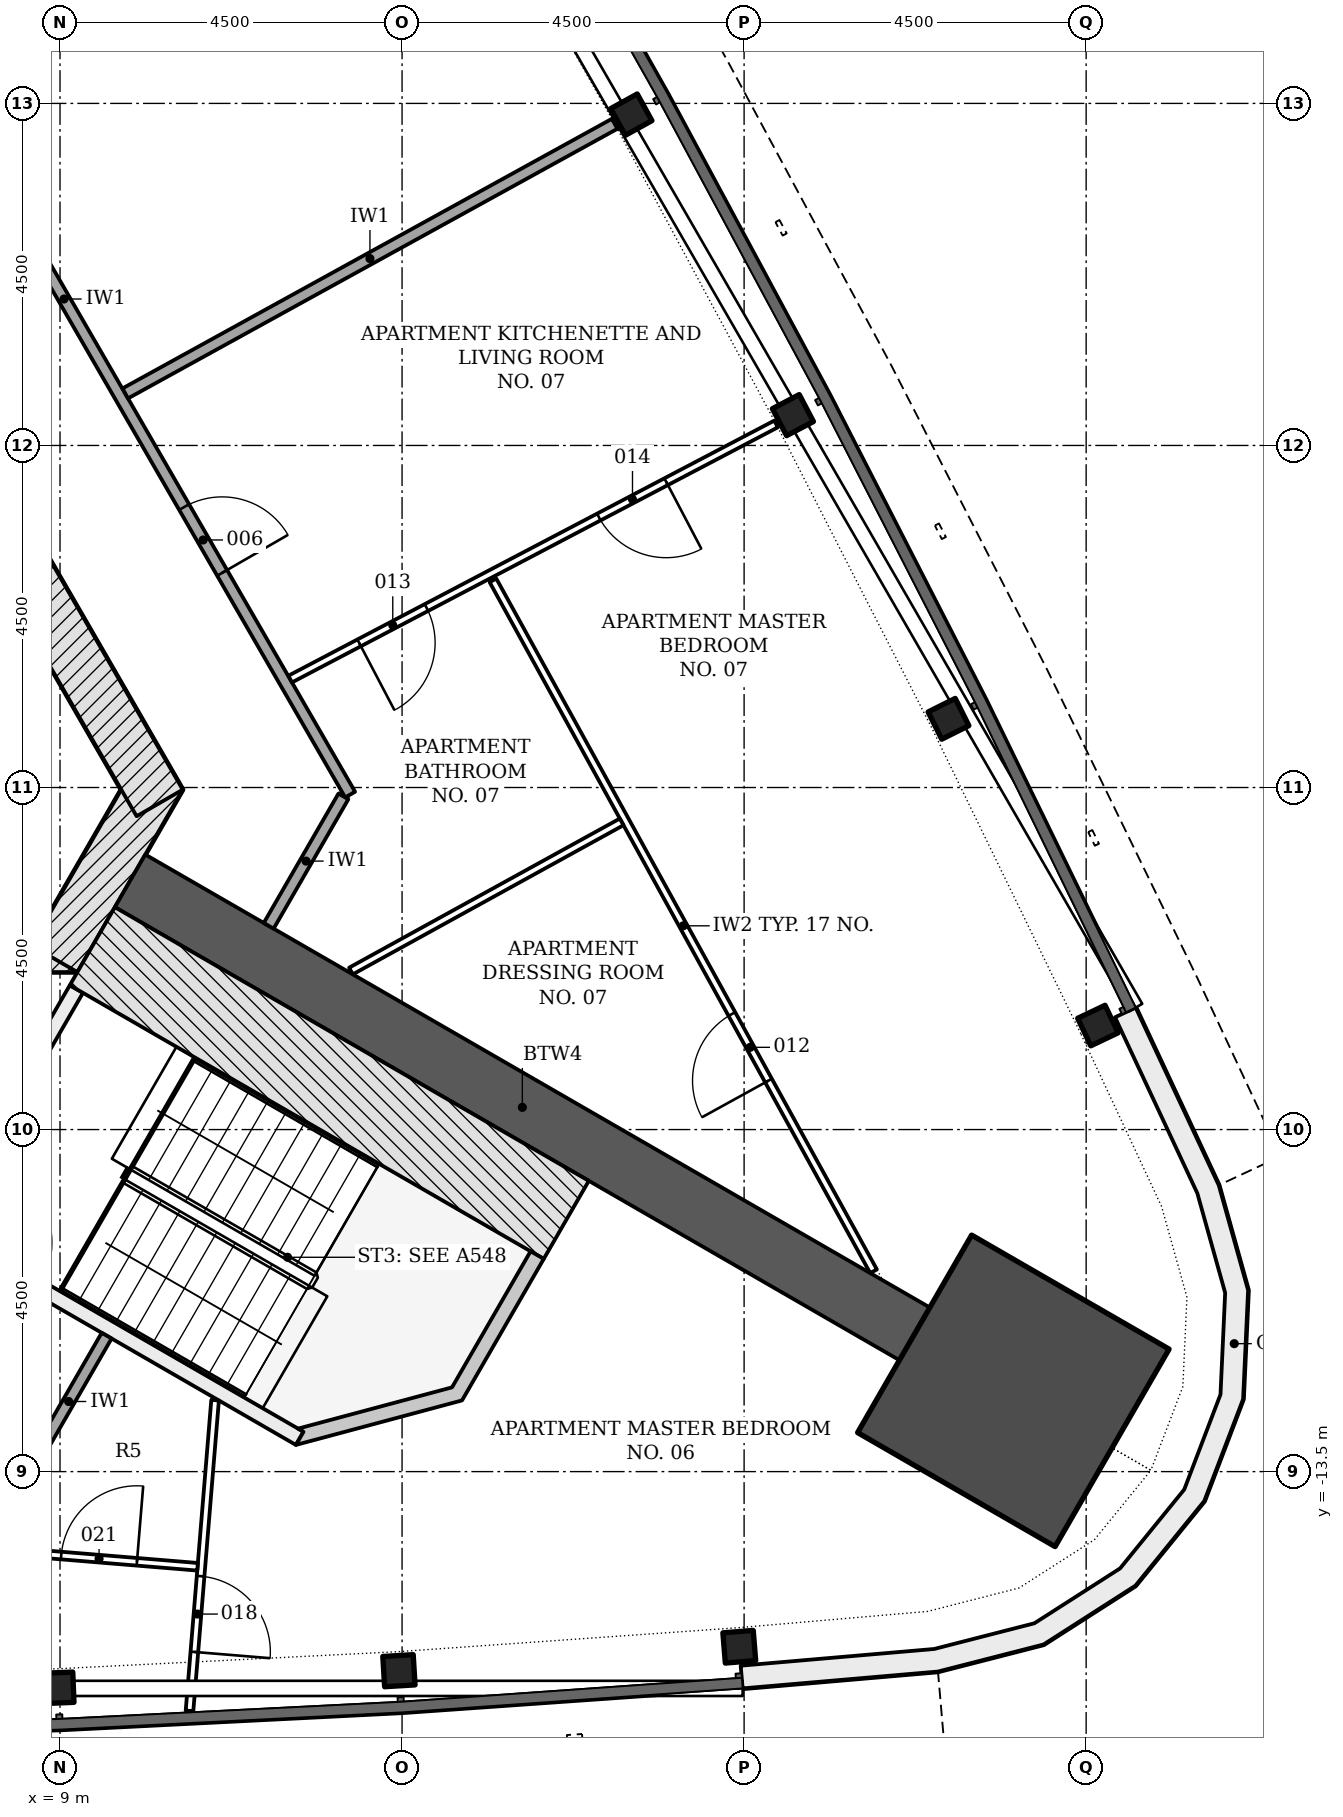
"""IFC4 building model, lengths in metres.
Left out: names, types, materials, properties, quantities, classifications, styles, units other than length and angle.
Written with IfcOpenShell. Run it as: python <this file> out.ifc"""

import sys

from ifc_helpers import new_model, si_unit, direction, frame, frame_2d, origin, origin_2d, place, context, subcontext, project, spatial, polyline, rectangle, i_section, outline, extrude, element, fill, save


model = new_model("IFC4")
c1 = context("Model", 3, precision=1e-05, world=origin(), true_north=direction((0.0, 1.0)))
c2 = subcontext(c1, "Body", "Model", "MODEL_VIEW")
j1 = project(units=[si_unit("LENGTHUNIT", "METRE"), si_unit("PLANEANGLEUNIT", "RADIAN")], contexts=[c1])
p1 = place(None, origin())
s1 = spatial("IfcSite", under=j1, at=p1, CompositionType="ELEMENT")
p2 = place(p1, origin())
s2 = spatial("IfcBuilding", under=s1, at=p2, CompositionType="ELEMENT")
p3 = place(p2, frame((0.0, 0.0, 109.5)))
s3 = spatial("IfcBuildingStorey", under=s2, at=p3, CompositionType="ELEMENT", Elevation=109.5)
p4 = place(p3, frame((-9.229, -6.578, -0.2), z_axis=(0.0, 0.0, 1.0), x_axis=(1.0, 0.0, 0.0)))
e1 = element("IfcWall", 1, at=p4, inside=s3, PredefinedType="SHEAR", context=c2, shape_type="SweptSolid", body=[
    extrude(rectangle(XDim=18.458, YDim=0.7, at=frame_2d((9.229, 0.0))), origin(), (0.0, 0.0, 1.0), 3.6),
])
p5 = place(p4, frame((3.304, 0.0, 0.2)))
e2 = element("IfcOpeningElement", 2, at=p5, cuts=e1, PredefinedType="OPENING", context=c2, shape_type="SweptSolid", body=[
    extrude(rectangle(XDim=1.1, YDim=2.1, at=frame_2d((0.55, 1.05))), frame((0.0, 0.36, 0.0), z_axis=(0.0, -1.0, 0.0), x_axis=(1.0, 0.0, 0.0)), (0.0, 0.0, 1.0), 0.72),
])
p6 = place(p4, frame((5.454, 0.0, 0.2)))
e3 = element("IfcOpeningElement", 3, at=p6, cuts=e1, PredefinedType="OPENING", context=c2, shape_type="SweptSolid", body=[
    extrude(rectangle(XDim=1.1, YDim=2.1, at=frame_2d((0.55, 1.05))), frame((0.0, 0.36, 0.0), z_axis=(0.0, -1.0, 0.0), x_axis=(1.0, 0.0, 0.0)), (0.0, 0.0, 1.0), 0.72),
])
p7 = place(p4, frame((7.604, 0.0, 0.2)))
e4 = element("IfcOpeningElement", 4, at=p7, cuts=e1, PredefinedType="OPENING", context=c2, shape_type="SweptSolid", body=[
    extrude(rectangle(XDim=1.1, YDim=2.1, at=frame_2d((0.55, 1.05))), frame((0.0, 0.36, 0.0), z_axis=(0.0, -1.0, 0.0), x_axis=(1.0, 0.0, 0.0)), (0.0, 0.0, 1.0), 0.72),
])
p8 = place(p4, frame((9.754, 0.0, 0.2)))
e5 = element("IfcOpeningElement", 5, at=p8, cuts=e1, PredefinedType="OPENING", context=c2, shape_type="SweptSolid", body=[
    extrude(rectangle(XDim=1.1, YDim=2.1, at=frame_2d((0.55, 1.05))), frame((0.0, 0.36, 0.0), z_axis=(0.0, -1.0, 0.0), x_axis=(1.0, 0.0, 0.0)), (0.0, 0.0, 1.0), 0.72),
])
p9 = place(p4, frame((11.904, 0.0, 0.2)))
e6 = element("IfcOpeningElement", 6, at=p9, cuts=e1, PredefinedType="OPENING", context=c2, shape_type="SweptSolid", body=[
    extrude(rectangle(XDim=1.1, YDim=2.1, at=frame_2d((0.55, 1.05))), frame((0.0, 0.36, 0.0), z_axis=(0.0, -1.0, 0.0), x_axis=(1.0, 0.0, 0.0)), (0.0, 0.0, 1.0), 0.72),
])
p10 = place(p4, frame((14.054, 0.0, 0.2)))
e7 = element("IfcOpeningElement", 7, at=p10, cuts=e1, PredefinedType="OPENING", context=c2, shape_type="SweptSolid", body=[
    extrude(rectangle(XDim=1.1, YDim=2.1, at=frame_2d((0.55, 1.05))), frame((0.0, 0.36, 0.0), z_axis=(0.0, -1.0, 0.0), x_axis=(1.0, 0.0, 0.0)), (0.0, 0.0, 1.0), 0.72),
])
p11 = place(p4, frame((1.029, 0.0, 0.2)))
e8 = element("IfcOpeningElement", 8, at=p11, cuts=e1, PredefinedType="OPENING", context=c2, shape_type="SweptSolid", body=[
    extrude(rectangle(XDim=1.0, YDim=2.1, at=frame_2d((0.5, 1.05))), frame((0.0, 0.36, 0.0), z_axis=(0.0, -1.0, 0.0), x_axis=(1.0, 0.0, 0.0)), (0.0, 0.0, 1.0), 0.72),
])
p12 = place(p3, frame((8.926, -6.753, -0.2), z_axis=(0.0, 0.0, 1.0), x_axis=(0.500042739161, 0.866000726912, 0.0)))
e9 = element("IfcWall", 9, at=p12, inside=s3, PredefinedType="SHEAR", context=c2, shape_type="SweptSolid", body=[
    extrude(rectangle(XDim=2.771, YDim=0.7, at=frame_2d((1.386, 0.0))), origin(), (0.0, 0.0, 1.0), 3.6),
])
p13 = place(p3, frame((10.311, -4.703, -0.2), z_axis=(0.0, 0.0, 1.0), x_axis=(-0.500001446645, 0.866024568562, 0.0)))
e10 = element("IfcWall", 10, at=p13, inside=s3, PredefinedType="SHEAR", context=c2, shape_type="SweptSolid", body=[
    extrude(rectangle(XDim=18.458, YDim=0.7, at=frame_2d((9.229, 0.0))), origin(), (0.0, 0.0, 1.0), 3.6),
])
p14 = place(p13, frame((10.5, 0.0, 0.2)))
e11 = element("IfcOpeningElement", 11, at=p14, cuts=e10, PredefinedType="OPENING", context=c2, shape_type="SweptSolid", body=[
    extrude(rectangle(XDim=1.0, YDim=2.1, at=frame_2d((0.5, 1.05))), frame((0.0, 0.36, 0.0), z_axis=(0.0, -1.0, 0.0), x_axis=(1.0, 0.0, 0.0)), (0.0, 0.0, 1.0), 0.72),
])
p15 = place(p13, frame((4.877, 0.0, 0.2)))
e12 = element("IfcOpeningElement", 12, at=p15, cuts=e10, PredefinedType="OPENING", context=c2, shape_type="SweptSolid", body=[
    extrude(rectangle(XDim=0.9, YDim=2.1, at=frame_2d((0.45, 1.05))), frame((0.0, 0.36, 0.0), z_axis=(0.0, -1.0, 0.0), x_axis=(1.0, 0.0, 0.0)), (0.0, 0.0, 1.0), 0.72),
])
p16 = place(p13, frame((14.452, 0.0, 0.2)))
e13 = element("IfcOpeningElement", 13, at=p16, cuts=e10, PredefinedType="OPENING", context=c2, shape_type="SweptSolid", body=[
    extrude(rectangle(XDim=0.9, YDim=2.1, at=frame_2d((0.45, 1.05))), frame((0.0, 0.36, 0.0), z_axis=(0.0, -1.0, 0.0), x_axis=(1.0, 0.0, 0.0)), (0.0, 0.0, 1.0), 0.72),
])
p17 = place(p3, frame((9.922, -5.728, -0.2), z_axis=(0.0, 0.0, 1.0), x_axis=(0.866027307971, -0.499996701837, 0.0)))
e14 = element("IfcWall", 14, at=p17, inside=s3, PredefinedType="SHEAR", context=c2, shape_type="SweptSolid", body=[
    extrude(rectangle(XDim=11.918, YDim=0.8, at=frame_2d((5.959, 0.0))), origin(), (0.0, 0.0, 1.0), 3.6),
])
p18 = place(p3, frame((21.542, -12.438, -0.2), z_axis=(0.0, 0.0, 1.0), x_axis=(0.866025403784, -0.5, 0.0)))
e15 = element("IfcColumn", 15, at=p18, inside=s3, PredefinedType="COLUMN", context=c2, shape_type="SweptSolid", body=[
    extrude(rectangle(XDim=3.0, YDim=3.0, at=origin_2d()), origin(), (0.0, 0.0, 1.0), 3.6),
])
for number, where, z_axis, x_axis in (
    (16, (8.976, -16.344, -0.2), (0.0, 0.0, 1.0), (0.999, 0.04, 0.0)),
    (17, (13.459, -16.119, -0.2), (0.0, 0.0, 1.0), (0.998, 0.06, 0.0)),
    (18, (17.937, -15.804, -0.2), (0.0, 0.0, 1.0), (0.997, 0.08, 0.0)),
    (19, (22.655, -7.632, -0.2), (0.0, 0.0, 1.0), (-0.429, 0.903, 0.0)),
    (20, (20.689, -3.596, -0.2), (0.0, 0.0, 1.0), (-0.447, 0.895, 0.0)),
    (21, (18.642, 0.399, -0.2), (0.0, 0.0, 1.0), (-0.465, 0.885, 0.0)),
    (22, (16.516, 4.353, -0.2), (0.0, 0.0, 1.0), (-0.483, 0.876, 0.0)),
):
    element("IfcColumn", number, at=place(p3, frame(where, z_axis=z_axis, x_axis=x_axis)), inside=s3, PredefinedType="COLUMN", context=c2, shape_type="SweptSolid", body=[
        extrude(i_section(OverallWidth=0.401, OverallDepth=0.399, WebThickness=0.025, FlangeThickness=0.04, FilletRadius=0.015, at=origin_2d()), origin(), (0.0, 0.0, 1.0), 3.6),
    ])
p19 = place(p3, origin())
e23 = element("IfcWall", 23, at=p19, inside=s3, PredefinedType="NOTDEFINED", context=c2, shape_type="SweptSolid", body=[
    extrude(outline(polyline([(17.981, -16.352), (20.551, -16.13), (21.94, -15.774), (23.148, -15.0), (24.054, -13.887), (24.565, -12.547), (24.631, -11.114), (24.245, -9.732), (23.152, -7.396), (22.88, -7.523), (23.962, -9.837), (24.329, -11.148), (24.267, -12.485), (23.791, -13.735), (22.946, -14.774), (21.819, -15.495), (20.5, -15.833), (17.955, -16.053), (17.981, -16.352)])), origin(), (0.0, 0.0, 1.0), 3.3),
])
p20 = place(p3, frame((7.44, -10.226, -0.2), z_axis=(0.0, 0.0, 1.0), x_axis=(0.500022077904, 0.866012656725, 0.0)))
e24 = element("IfcWall", 24, at=p20, inside=s3, PredefinedType="SHEAR", context=c2, shape_type="SweptSolid", body=[
    extrude(rectangle(XDim=3.55, YDim=0.2, at=frame_2d((1.775, 0.0))), origin(), (0.0, 0.0, 1.0), 3.6),
])
p21 = place(p20, frame((1.175, 0.0, 0.2)))
e25 = element("IfcOpeningElement", 25, at=p21, cuts=e24, PredefinedType="OPENING", context=c2, shape_type="SweptSolid", body=[
    extrude(rectangle(XDim=1.2, YDim=2.1, at=frame_2d((0.6, 1.05))), frame((0.0, 0.11, 0.0), z_axis=(0.0, -1.0, 0.0), x_axis=(1.0, 0.0, 0.0)), (0.0, 0.0, 1.0), 0.22),
])
p22 = place(p3, frame((7.304, -10.262, -0.2), z_axis=(0.0, 0.0, 1.0), x_axis=(0.866026594901, -0.49999793692, 0.0)))
e26 = element("IfcWall", 26, at=p22, inside=s3, PredefinedType="SHEAR", context=c2, shape_type="SweptSolid", body=[
    extrude(rectangle(XDim=5.6, YDim=0.2, at=frame_2d((2.8, 0.0))), origin(), (0.0, 0.0, 1.0), 3.6),
])
p23 = place(p22, frame((0.45, 0.0, 0.2)))
e27 = element("IfcOpeningElement", 27, at=p23, cuts=e26, PredefinedType="OPENING", context=c2, shape_type="SweptSolid", body=[
    extrude(rectangle(XDim=1.2, YDim=2.1, at=frame_2d((0.6, 1.05))), frame((0.0, 0.11, 0.0), z_axis=(0.0, -1.0, 0.0), x_axis=(1.0, 0.0, 0.0)), (0.0, 0.0, 1.0), 0.22),
])
p24 = place(p3, frame((9.425, -6.588, -0.2), z_axis=(0.0, 0.0, 1.0), x_axis=(0.866018442252, -0.500012057535, 0.0)))
e28 = element("IfcWall", 28, at=p24, inside=s3, PredefinedType="SHEAR", context=c2, shape_type="SweptSolid", body=[
    extrude(rectangle(XDim=7.2, YDim=1.186, at=frame_2d((3.6, 0.0))), origin(), (0.0, 0.0, 1.0), 3.6),
])
p25 = place(p3, frame((0.0, 0.0, -0.2)))
e29 = element("IfcWall", 29, at=p25, inside=s3, PredefinedType="SHEAR", context=c2, shape_type="SweptSolid", body=[
    extrude(outline(polyline([(12.104, -13.149), (14.289, -12.563), (15.364, -10.701), (15.191, -10.601), (14.157, -12.392), (12.132, -12.934), (12.204, -12.976), (12.204, -12.976), (12.204, -12.976), (12.204, -12.976), (12.204, -12.976), (12.204, -12.976), (12.204, -12.976), (12.204, -12.976), (12.204, -12.976), (12.204, -12.976), (12.204, -12.976), (12.204, -12.976), (12.204, -12.976), (12.204, -12.976), (12.204, -12.976), (12.204, -12.976), (12.204, -12.976), (12.104, -13.149)])), origin(), (0.0, 0.0, 1.0), 3.6),
])
p26 = place(p3, frame((5.289, 8.446, 0.0), z_axis=(0.0, 0.0, 1.0), x_axis=(0.499996620721, -0.866027354803, 0.0)))
e30 = element("IfcWall", 30, at=p26, inside=s3, PredefinedType="PARTITIONING", context=c2, shape_type="SweptSolid", body=[
    extrude(rectangle(XDim=15.057, YDim=0.15, at=frame_2d((7.528, 0.0))), origin(), (0.0, 0.0, 1.0), 2.847),
])
p27 = place(p26, frame((10.689, 0.0, 0.0)))
e31 = element("IfcOpeningElement", 31, at=p27, cuts=e30, PredefinedType="OPENING", context=c2, shape_type="SweptSolid", body=[
    extrude(rectangle(XDim=1.0, YDim=2.1, at=frame_2d((0.5, 1.05))), frame((0.0, 0.085, 0.0), z_axis=(0.0, -1.0, 0.0), x_axis=(1.0, 0.0, 0.0)), (0.0, 0.0, 1.0), 0.17),
])
p28 = place(p26, frame((4.695, 0.0, 0.0)))
e32 = element("IfcOpeningElement", 32, at=p28, cuts=e30, PredefinedType="OPENING", context=c2, shape_type="SweptSolid", body=[
    extrude(rectangle(XDim=1.0, YDim=2.1, at=frame_2d((0.5, 1.05))), frame((0.0, 0.085, 0.0), z_axis=(0.0, -1.0, 0.0), x_axis=(1.0, 0.0, 0.0)), (0.0, 0.0, 1.0), 0.17),
])
p29 = place(p3, frame((8.614, -13.444, 0.0), z_axis=(0.0, 0.0, 1.0), x_axis=(0.499972520799, 0.866041268327, 0.0)))
e33 = element("IfcWall", 33, at=p29, inside=s3, PredefinedType="PARTITIONING", context=c2, shape_type="SweptSolid", body=[
    extrude(rectangle(XDim=2.0, YDim=0.15, at=frame_2d((1.0, 0.0))), origin(), (0.0, 0.0, 1.0), 2.923),
])
p30 = place(p3, frame((11.745, -6.319, 0.0), z_axis=(0.0, 0.0, 1.0), x_axis=(0.500012721296, 0.866018059016, 0.0)))
e34 = element("IfcWall", 34, at=p30, inside=s3, PredefinedType="PARTITIONING", context=c2, shape_type="SweptSolid", body=[
    extrude(rectangle(XDim=1.966, YDim=0.15, at=frame_2d((0.983, 0.0))), origin(), (0.0, 0.0, 1.0), 3.4),
])
p31 = place(p3, frame((16.297, 4.232, 0.0), z_axis=(0.0, 0.0, 1.0), x_axis=(-0.875895262359, -0.482501284327, 0.0)))
e35 = element("IfcWall", 35, at=p31, inside=s3, PredefinedType="PARTITIONING", context=c2, shape_type="SweptSolid", body=[
    extrude(rectangle(XDim=7.351, YDim=0.15, at=frame_2d((3.676, 0.0))), origin(), (0.0, 0.0, 1.0), 2.847),
])
p32 = place(p3, frame((19.703, -10.864, 0.0), z_axis=(0.0, 0.0, 1.0), x_axis=(-0.482505676042, 0.875892843096, 0.0)))
e36 = element("IfcWall", 36, at=p32, inside=s3, PredefinedType="PARTITIONING", context=c2, shape_type="SweptSolid", body=[
    extrude(rectangle(XDim=10.377, YDim=0.1, at=frame_2d((5.188, 0.0))), origin(), (0.0, 0.0, 1.0), 2.847),
])
p33 = place(p32, frame((2.864, 0.0, 0.0)))
e37 = element("IfcOpeningElement", 37, at=p33, cuts=e36, PredefinedType="OPENING", context=c2, shape_type="SweptSolid", body=[
    extrude(rectangle(XDim=1.0, YDim=2.1, at=frame_2d((0.5, 1.05))), frame((0.0, 0.06, 0.0), z_axis=(0.0, -1.0, 0.0), x_axis=(1.0, 0.0, 0.0)), (0.0, 0.0, 1.0), 0.12),
])
p34 = place(p3, frame((18.421, 0.283, 0.0), z_axis=(0.0, 0.0, 1.0), x_axis=(-0.885392336097, -0.464844502151, 0.0)))
e38 = element("IfcWall", 38, at=p34, inside=s3, PredefinedType="PARTITIONING", context=c2, shape_type="SweptSolid", body=[
    extrude(rectangle(XDim=7.22, YDim=0.1, at=frame_2d((3.61, 0.0))), origin(), (0.0, 0.0, 1.0), 2.847),
])
p35 = place(p34, frame((5.196, 0.0, 0.0)))
e39 = element("IfcOpeningElement", 39, at=p35, cuts=e38, PredefinedType="OPENING", context=c2, shape_type="SweptSolid", body=[
    extrude(rectangle(XDim=1.0, YDim=2.1, at=frame_2d((0.5, 1.05))), frame((0.0, 0.06, 0.0), z_axis=(0.0, -1.0, 0.0), x_axis=(1.0, 0.0, 0.0)), (0.0, 0.0, 1.0), 0.12),
])
p36 = place(p34, frame((1.634, 0.0, 0.0)))
e40 = element("IfcOpeningElement", 40, at=p36, cuts=e38, PredefinedType="OPENING", context=c2, shape_type="SweptSolid", body=[
    extrude(rectangle(XDim=1.0, YDim=2.1, at=frame_2d((0.5, 1.05))), frame((0.0, 0.06, 0.0), z_axis=(0.0, -1.0, 0.0), x_axis=(1.0, 0.0, 0.0)), (0.0, 0.0, 1.0), 0.12),
])
p37 = place(p3, frame((16.389, -4.952, 0.0), z_axis=(0.0, 0.0, 1.0), x_axis=(-0.875896259157, -0.482499474814, 0.0)))
e41 = element("IfcWall", 41, at=p37, inside=s3, PredefinedType="PARTITIONING", context=c2, shape_type="SweptSolid", body=[
    extrude(rectangle(XDim=4.066, YDim=0.1, at=frame_2d((2.033, 0.0))), origin(), (0.0, 0.0, 1.0), 3.4),
])
p38 = place(p3, frame((11.04, -12.56, 0.0), z_axis=(0.0, 0.0, 1.0), x_axis=(-0.08207509454, -0.996626147989, 0.0)))
e42 = element("IfcWall", 42, at=p38, inside=s3, PredefinedType="PARTITIONING", context=c2, shape_type="SweptSolid", body=[
    extrude(rectangle(XDim=4.102, YDim=0.1, at=frame_2d((2.051, 0.0))), origin(), (0.0, 0.0, 1.0), 2.974),
])
p39 = place(p38, frame((2.324, 0.0, 0.0)))
e43 = element("IfcOpeningElement", 43, at=p39, cuts=e42, PredefinedType="OPENING", context=c2, shape_type="SweptSolid", body=[
    extrude(rectangle(XDim=1.0, YDim=2.1, at=frame_2d((0.5, 1.05))), frame((0.0, 0.06, 0.0), z_axis=(0.0, -1.0, 0.0), x_axis=(1.0, 0.0, 0.0)), (0.0, 0.0, 1.0), 0.12),
])
p40 = place(p3, frame((8.168, -14.534, 0.0), z_axis=(0.0, 0.0, 1.0), x_axis=(0.996625350035, -0.082084783406, 0.0)))
e44 = element("IfcWall", 44, at=p40, inside=s3, PredefinedType="PARTITIONING", context=c2, shape_type="SweptSolid", body=[
    extrude(rectangle(XDim=2.65, YDim=0.1, at=frame_2d((1.325, 0.0))), origin(), (0.0, 0.0, 1.0), 2.923),
])
p41 = place(p40, frame((0.85, 0.0, 0.0)))
e45 = element("IfcOpeningElement", 45, at=p41, cuts=e44, PredefinedType="OPENING", context=c2, shape_type="SweptSolid", body=[
    extrude(rectangle(XDim=1.0, YDim=2.1, at=frame_2d((0.5, 1.05))), frame((0.0, 0.06, 0.0), z_axis=(0.0, -1.0, 0.0), x_axis=(1.0, 0.0, 0.0)), (0.0, 0.0, 1.0), 0.12),
])
p42 = place(p27, origin())
e46 = element("IfcDoor", 46, at=p42, inside=s3, OperationType="SINGLE_SWING_RIGHT", PredefinedType="DOOR", context=c2, shape_type="SweptSolid", body=[
    extrude(rectangle(XDim=1.0, YDim=2.1, at=frame_2d((0.5, 1.05))), frame((0.0, 0.025, 0.0), z_axis=(0.0, -1.0, 0.0), x_axis=(1.0, 0.0, 0.0)), (0.0, 0.0, 1.0), 0.05),
])
fill(e31, e46)
p43 = place(p33, origin())
e47 = element("IfcDoor", 47, at=p43, inside=s3, OperationType="SINGLE_SWING_LEFT", PredefinedType="DOOR", context=c2, shape_type="SweptSolid", body=[
    extrude(rectangle(XDim=1.0, YDim=2.1, at=frame_2d((0.5, 1.05))), frame((0.0, 0.025, 0.0), z_axis=(0.0, -1.0, 0.0), x_axis=(1.0, 0.0, 0.0)), (0.0, 0.0, 1.0), 0.05),
])
fill(e37, e47)
p44 = place(p35, origin())
e48 = element("IfcDoor", 48, at=p44, inside=s3, OperationType="SINGLE_SWING_RIGHT", PredefinedType="DOOR", context=c2, shape_type="SweptSolid", body=[
    extrude(rectangle(XDim=1.0, YDim=2.1, at=frame_2d((0.5, 1.05))), frame((0.0, 0.025, 0.0), z_axis=(0.0, -1.0, 0.0), x_axis=(1.0, 0.0, 0.0)), (0.0, 0.0, 1.0), 0.05),
])
fill(e39, e48)
p45 = place(p36, origin())
e49 = element("IfcDoor", 49, at=p45, inside=s3, OperationType="SINGLE_SWING_LEFT", PredefinedType="DOOR", context=c2, shape_type="SweptSolid", body=[
    extrude(rectangle(XDim=1.0, YDim=2.1, at=frame_2d((0.5, 1.05))), frame((0.0, 0.025, 0.0), z_axis=(0.0, -1.0, 0.0), x_axis=(1.0, 0.0, 0.0)), (0.0, 0.0, 1.0), 0.05),
])
fill(e40, e49)
p46 = place(p39, origin())
e50 = element("IfcDoor", 50, at=p46, inside=s3, OperationType="SINGLE_SWING_RIGHT", PredefinedType="DOOR", context=c2, shape_type="SweptSolid", body=[
    extrude(rectangle(XDim=1.0, YDim=2.1, at=frame_2d((0.5, 1.05))), frame((0.0, 0.025, 0.0), z_axis=(0.0, -1.0, 0.0), x_axis=(1.0, 0.0, 0.0)), (0.0, 0.0, 1.0), 0.05),
])
fill(e43, e50)
p47 = place(p41, origin())
e51 = element("IfcDoor", 51, at=p47, inside=s3, OperationType="SINGLE_SWING_RIGHT", PredefinedType="DOOR", context=c2, shape_type="SweptSolid", body=[
    extrude(rectangle(XDim=1.0, YDim=2.1, at=frame_2d((0.5, 1.05))), frame((0.0, 0.025, 0.0), z_axis=(0.0, -1.0, 0.0), x_axis=(1.0, 0.0, 0.0)), (0.0, 0.0, 1.0), 0.05),
])
fill(e45, e51)
save(model, sys.argv[1])
